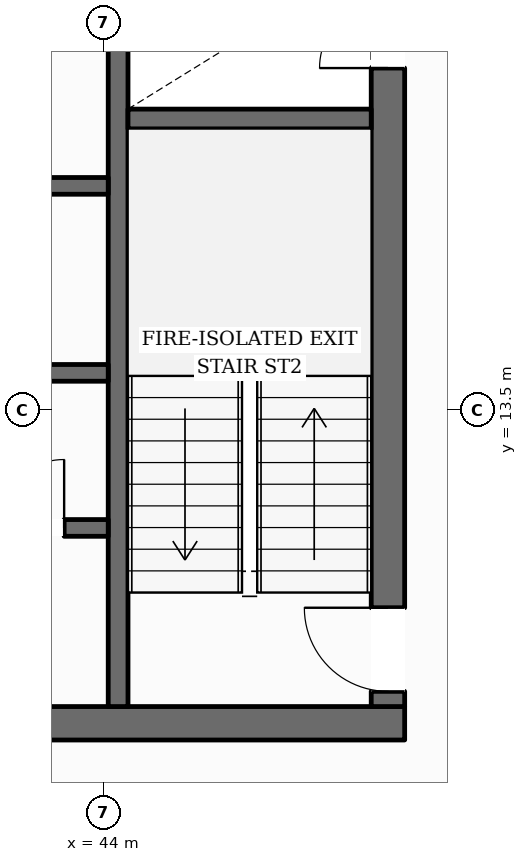
"""IFC4 building model, lengths in metres.
Left out: names, types, materials, properties, quantities, classifications, styles, units other than length and angle.
Written with IfcOpenShell. Run it as: python <this file> out.ifc"""

import sys

from ifc_helpers import new_model, si_unit, direction, frame, frame_2d, origin, place, context, subcontext, project, spatial, rectangle, extrude, element, fill, save


model = new_model("IFC4")
c1 = context("Model", 3, precision=1e-05, world=origin(), true_north=direction((0.0, 1.0)))
c2 = subcontext(c1, "Body", "Model", "MODEL_VIEW")
j1 = project(units=[si_unit("LENGTHUNIT", "METRE"), si_unit("PLANEANGLEUNIT", "RADIAN")], contexts=[c1])
p1 = place(None, origin())
s1 = spatial("IfcSite", under=j1, at=p1, CompositionType="ELEMENT")
p2 = place(p1, origin())
s2 = spatial("IfcBuilding", under=s1, at=p2, CompositionType="ELEMENT")
p3 = place(p2, frame((0.0, 0.0, 195.8)))
s3 = spatial("IfcBuildingStorey", under=s2, at=p3, CompositionType="ELEMENT", Elevation=195.8)
p4 = place(p3, frame((28.04, 9.38, 0.0), z_axis=(0.0, 0.0, 1.0), x_axis=(1.0, 0.0, 0.0)))
e1 = element("IfcWall", 1, at=p4, inside=s3, PredefinedType="SOLIDWALL", context=c2, shape_type="SweptSolid", body=[
    extrude(rectangle(XDim=19.92, YDim=0.44, at=frame_2d((9.96, 0.0))), origin(), (0.0, 0.0, 1.0), 3.6),
])
p5 = place(p4, frame((10.46, 0.0, 0.0)))
e2 = element("IfcOpeningElement", 2, at=p5, cuts=e1, PredefinedType="OPENING", context=c2, shape_type="SweptSolid", body=[
    extrude(rectangle(XDim=1.4, YDim=2.2, at=frame_2d((0.7, 1.1))), frame((0.0, 0.23, 0.0), z_axis=(0.0, -1.0, 0.0), x_axis=(1.0, 0.0, 0.0)), (0.0, 0.0, 1.0), 0.46),
])
p6 = place(p3, frame((47.74, 9.6, 0.0), z_axis=(0.0, 0.0, 1.0), x_axis=(0.0, 1.0, 0.0)))
e3 = element("IfcWall", 3, at=p6, inside=s3, PredefinedType="SOLIDWALL", context=c2, shape_type="SweptSolid", body=[
    extrude(rectangle(XDim=13.0, YDim=0.44, at=frame_2d((6.5, 0.0))), origin(), (0.0, 0.0, 1.0), 3.6),
])
p7 = place(p6, frame((0.2, 0.0, 0.0)))
e4 = element("IfcOpeningElement", 4, at=p7, cuts=e3, PredefinedType="OPENING", context=c2, shape_type="SweptSolid", body=[
    extrude(rectangle(XDim=1.1, YDim=2.15, at=frame_2d((0.55, 1.075))), frame((0.0, 0.23, 0.0), z_axis=(0.0, -1.0, 0.0), x_axis=(1.0, 0.0, 0.0)), (0.0, 0.0, 1.0), 0.46),
])
p8 = place(p6, frame((8.4, 0.0, 0.0)))
e5 = element("IfcOpeningElement", 5, at=p8, cuts=e3, PredefinedType="OPENING", context=c2, shape_type="SweptSolid", body=[
    extrude(rectangle(XDim=0.9, YDim=2.1, at=frame_2d((0.45, 1.05))), frame((0.0, 0.23, 0.0), z_axis=(0.0, -1.0, 0.0), x_axis=(1.0, 0.0, 0.0)), (0.0, 0.0, 1.0), 0.46),
])
p9 = place(p3, frame((44.19, 9.6, 0.0), z_axis=(0.0, 0.0, 1.0), x_axis=(0.0, 1.0, 0.0)))
e6 = element("IfcWall", 6, at=p9, inside=s3, PredefinedType="SHEAR", context=c2, shape_type="SweptSolid", body=[
    extrude(rectangle(XDim=13.0, YDim=0.26, at=frame_2d((6.5, 0.0))), origin(), (0.0, 0.0, 1.0), 3.6),
])
p10 = place(p9, frame((10.925, 0.0, 0.0)))
e7 = element("IfcOpeningElement", 7, at=p10, cuts=e6, PredefinedType="OPENING", context=c2, shape_type="SweptSolid", body=[
    extrude(rectangle(XDim=1.25, YDim=2.25, at=frame_2d((0.625, 1.125))), frame((0.0, 0.14, 0.0), z_axis=(0.0, -1.0, 0.0), x_axis=(1.0, 0.0, 0.0)), (0.0, 0.0, 1.0), 0.28),
])
p11 = place(p3, frame((44.32, 17.33, 0.0), z_axis=(0.0, 0.0, 1.0), x_axis=(1.0, 0.0, 0.0)))
e8 = element("IfcWall", 8, at=p11, inside=s3, PredefinedType="SHEAR", context=c2, shape_type="SweptSolid", body=[
    extrude(rectangle(XDim=3.2, YDim=0.26, at=frame_2d((1.6, 0.0))), origin(), (0.0, 0.0, 1.0), 3.6),
])
p12 = place(p3, frame((31.94, 16.45, 0.0), z_axis=(0.0, 0.0, 1.0), x_axis=(1.0, 0.0, 0.0)))
e9 = element("IfcWall", 9, at=p12, inside=s3, PredefinedType="SOLIDWALL", context=c2, shape_type="SweptSolid", body=[
    extrude(rectangle(XDim=12.12, YDim=0.22, at=frame_2d((6.06, 0.0))), origin(), (0.0, 0.0, 1.0), 3.6),
])
p13 = place(p3, frame((31.94, 13.99, 0.0), z_axis=(0.0, 0.0, 1.0), x_axis=(1.0, 0.0, 0.0)))
e10 = element("IfcWall", 10, at=p13, inside=s3, PredefinedType="SOLIDWALL", context=c2, shape_type="SweptSolid", body=[
    extrude(rectangle(XDim=12.12, YDim=0.22, at=frame_2d((6.06, 0.0))), origin(), (0.0, 0.0, 1.0), 3.6),
])
p14 = place(p13, frame((1.11, 0.0, 0.0)))
e11 = element("IfcOpeningElement", 11, at=p14, cuts=e10, PredefinedType="OPENING", context=c2, shape_type="SweptSolid", body=[
    extrude(rectangle(XDim=0.9, YDim=2.1, at=frame_2d((0.45, 1.05))), frame((0.0, 0.12, 0.0), z_axis=(0.0, -1.0, 0.0), x_axis=(1.0, 0.0, 0.0)), (0.0, 0.0, 1.0), 0.24),
])
p15 = place(p13, frame((5.16, 0.0, 0.0)))
e12 = element("IfcOpeningElement", 12, at=p15, cuts=e10, PredefinedType="OPENING", context=c2, shape_type="SweptSolid", body=[
    extrude(rectangle(XDim=0.9, YDim=2.1, at=frame_2d((0.45, 1.05))), frame((0.0, 0.12, 0.0), z_axis=(0.0, -1.0, 0.0), x_axis=(1.0, 0.0, 0.0)), (0.0, 0.0, 1.0), 0.24),
])
p16 = place(p13, frame((9.61, 0.0, 0.0)))
e13 = element("IfcOpeningElement", 13, at=p16, cuts=e10, PredefinedType="OPENING", context=c2, shape_type="SweptSolid", body=[
    extrude(rectangle(XDim=0.9, YDim=2.1, at=frame_2d((0.45, 1.05))), frame((0.0, 0.12, 0.0), z_axis=(0.0, -1.0, 0.0), x_axis=(1.0, 0.0, 0.0)), (0.0, 0.0, 1.0), 0.24),
])
p17 = place(p3, frame((40.28, 11.95, 0.0), z_axis=(0.0, 0.0, 1.0), x_axis=(1.0, 0.0, 0.0)))
e14 = element("IfcWall", 14, at=p17, inside=s3, PredefinedType="SOLIDWALL", context=c2, shape_type="SweptSolid", body=[
    extrude(rectangle(XDim=3.78, YDim=0.22, at=frame_2d((1.89, 0.0))), origin(), (0.0, 0.0, 1.0), 3.6),
])
p18 = place(p17, frame((0.47, 0.0, 0.0)))
e15 = element("IfcOpeningElement", 15, at=p18, cuts=e14, PredefinedType="OPENING", context=c2, shape_type="SweptSolid", body=[
    extrude(rectangle(XDim=0.9, YDim=2.1, at=frame_2d((0.45, 1.05))), frame((0.0, 0.12, 0.0), z_axis=(0.0, -1.0, 0.0), x_axis=(1.0, 0.0, 0.0)), (0.0, 0.0, 1.0), 0.24),
])
p19 = place(p17, frame((2.3, 0.0, 0.0)))
e16 = element("IfcOpeningElement", 16, at=p19, cuts=e14, PredefinedType="OPENING", context=c2, shape_type="SweptSolid", body=[
    extrude(rectangle(XDim=0.9, YDim=2.1, at=frame_2d((0.45, 1.05))), frame((0.0, 0.12, 0.0), z_axis=(0.0, -1.0, 0.0), x_axis=(1.0, 0.0, 0.0)), (0.0, 0.0, 1.0), 0.24),
])
p20 = place(p3, frame((42.444, 44.024, 0.0), z_axis=(0.0, 0.0, 1.0), x_axis=(0.507770038723, -0.861492651028, 0.0)))
e17 = element("IfcWall", 17, at=p20, inside=s3, PredefinedType="STANDARD", context=c2, shape_type="SweptSolid", body=[
    extrude(rectangle(XDim=38.049, YDim=0.35, at=frame_2d((19.024, 0.0))), origin(), (0.0, 0.0, 1.0), 3.132),
])
p21 = place(p20, frame((33.752, 0.0, 0.65)))
e18 = element("IfcOpeningElement", 18, at=p21, cuts=e17, PredefinedType="OPENING", context=c2, shape_type="SweptSolid", body=[
    extrude(rectangle(XDim=1.45, YDim=1.75, at=frame_2d((0.725, 0.875))), frame((0.0, 0.185, 0.0), z_axis=(0.0, -1.0, 0.0), x_axis=(1.0, 0.0, 0.0)), (0.0, 0.0, 1.0), 0.37),
])
p22 = place(p20, frame((27.569, 0.0, 0.65)))
e19 = element("IfcOpeningElement", 19, at=p22, cuts=e17, PredefinedType="OPENING", context=c2, shape_type="SweptSolid", body=[
    extrude(rectangle(XDim=1.45, YDim=1.75, at=frame_2d((0.725, 0.875))), frame((0.0, 0.185, 0.0), z_axis=(0.0, -1.0, 0.0), x_axis=(1.0, 0.0, 0.0)), (0.0, 0.0, 1.0), 0.37),
])
p23 = place(p20, frame((15.204, 0.0, 0.65)))
e20 = element("IfcOpeningElement", 20, at=p23, cuts=e17, PredefinedType="OPENING", context=c2, shape_type="SweptSolid", body=[
    extrude(rectangle(XDim=1.45, YDim=1.75, at=frame_2d((0.725, 0.875))), frame((0.0, 0.185, 0.0), z_axis=(0.0, -1.0, 0.0), x_axis=(1.0, 0.0, 0.0)), (0.0, 0.0, 1.0), 0.37),
])
p24 = place(p20, frame((9.021, 0.0, 0.65)))
e21 = element("IfcOpeningElement", 21, at=p24, cuts=e17, PredefinedType="OPENING", context=c2, shape_type="SweptSolid", body=[
    extrude(rectangle(XDim=1.45, YDim=1.75, at=frame_2d((0.725, 0.875))), frame((0.0, 0.185, 0.0), z_axis=(0.0, -1.0, 0.0), x_axis=(1.0, 0.0, 0.0)), (0.0, 0.0, 1.0), 0.37),
])
p25 = place(p20, frame((2.839, 0.0, 0.65)))
e22 = element("IfcOpeningElement", 22, at=p25, cuts=e17, PredefinedType="OPENING", context=c2, shape_type="SweptSolid", body=[
    extrude(rectangle(XDim=1.45, YDim=1.75, at=frame_2d((0.725, 0.875))), frame((0.0, 0.185, 0.0), z_axis=(0.0, -1.0, 0.0), x_axis=(1.0, 0.0, 0.0)), (0.0, 0.0, 1.0), 0.37),
])
p26 = place(p7, origin())
e23 = element("IfcDoor", 23, at=p26, inside=s3, OperationType="SINGLE_SWING_RIGHT", PredefinedType="DOOR", context=c2, shape_type="SweptSolid", body=[
    extrude(rectangle(XDim=1.1, YDim=2.15, at=frame_2d((0.55, 1.075))), frame((0.0, 0.025, 0.0), z_axis=(0.0, -1.0, 0.0), x_axis=(1.0, 0.0, 0.0)), (0.0, 0.0, 1.0), 0.05),
])
fill(e4, e23)
p27 = place(p8, origin())
e24 = element("IfcDoor", 24, at=p27, inside=s3, OperationType="SINGLE_SWING_LEFT", PredefinedType="DOOR", context=c2, shape_type="SweptSolid", body=[
    extrude(rectangle(XDim=0.9, YDim=2.1, at=frame_2d((0.45, 1.05))), frame((0.0, 0.025, 0.0), z_axis=(0.0, -1.0, 0.0), x_axis=(1.0, 0.0, 0.0)), (0.0, 0.0, 1.0), 0.05),
])
fill(e5, e24)
p28 = place(p19, origin())
e25 = element("IfcDoor", 25, at=p28, inside=s3, OperationType="SINGLE_SWING_RIGHT", PredefinedType="DOOR", context=c2, shape_type="SweptSolid", body=[
    extrude(rectangle(XDim=0.9, YDim=2.1, at=frame_2d((0.45, 1.05))), frame((0.0, 0.025, 0.0), z_axis=(0.0, -1.0, 0.0), x_axis=(1.0, 0.0, 0.0)), (0.0, 0.0, 1.0), 0.05),
])
fill(e16, e25)
save(model, sys.argv[1])
